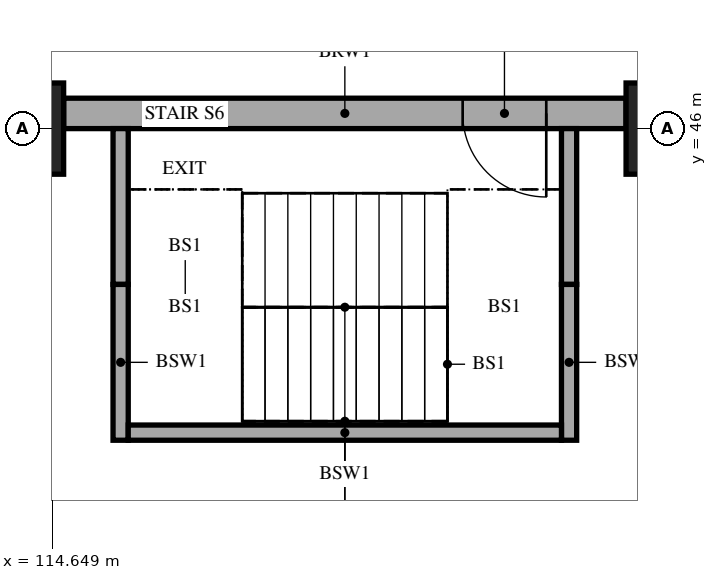
"""IFC4 building model, lengths in metres.
Left out: names, types, materials, properties, quantities, classifications, styles, units other than length and angle.
Written with IfcOpenShell. Run it as: python <this file> out.ifc"""

import sys

from ifc_helpers import new_model, si_unit, direction, frame, frame_2d, origin, origin_2d, place, context, subcontext, project, spatial, rectangle, extrude, element, fill, save


model = new_model("IFC4")
c1 = context("Model", 3, precision=1e-05, world=origin(), true_north=direction((0.0, 1.0)))
c2 = subcontext(c1, "Body", "Model", "MODEL_VIEW")
j1 = project(units=[si_unit("LENGTHUNIT", "METRE"), si_unit("PLANEANGLEUNIT", "RADIAN")], contexts=[c1])
p1 = place(None, origin())
s1 = spatial("IfcSite", under=j1, at=p1, CompositionType="ELEMENT")
p2 = place(p1, origin())
s2 = spatial("IfcBuilding", under=s1, at=p2, CompositionType="ELEMENT")
p3 = place(p2, frame((0.0, 0.0, -4.2)))
s3 = spatial("IfcBuildingStorey", under=s2, at=p3, CompositionType="ELEMENT", Elevation=-4.2)
for number, where, z_axis, x_axis in (
    (1, (114.0, 46.0, 0.0), (0.0, 0.0, 1.0), (1.0, 0.0, 0.0)),
    (2, (123.0, 46.0, 0.0), (0.0, 0.0, 1.0), (1.0, 0.0, 0.0)),
):
    element("IfcColumn", number, at=place(p3, frame(where, z_axis=z_axis, x_axis=x_axis)), inside=s3, PredefinedType="COLUMN", context=c2, shape_type="SweptSolid", body=[
        extrude(rectangle(XDim=1.6, YDim=1.2, at=origin_2d()), origin(), (0.0, 0.0, 1.0), 4.2),
    ])
p4 = place(p3, frame((114.8, 46.2, 0.0), z_axis=(0.0, 0.0, 1.0), x_axis=(1.0, 0.0, 0.0)))
e3 = element("IfcWall", 3, at=p4, inside=s3, PredefinedType="SOLIDWALL", context=c2, shape_type="SweptSolid", body=[
    extrude(rectangle(XDim=7.4, YDim=0.4, at=frame_2d((3.7, 0.0))), origin(), (0.0, 0.0, 1.0), 4.2),
])
p5 = place(p4, frame((5.25, 0.0, 0.0)))
e4 = element("IfcOpeningElement", 4, at=p5, cuts=e3, PredefinedType="OPENING", context=c2, shape_type="SweptSolid", body=[
    extrude(rectangle(XDim=1.1, YDim=2.1, at=frame_2d((0.55, 1.05))), frame((0.0, 0.21, 0.0), z_axis=(0.0, -1.0, 0.0), x_axis=(1.0, 0.0, 0.0)), (0.0, 0.0, 1.0), 0.42),
])
for number, where, z_axis, x_axis in (
    (5, (115.55, 46.0, 0.0), (0.0, 0.0, 1.0), (0.0, -1.0, 0.0)),
    (6, (115.55, 43.95, 0.0), (0.0, 0.0, 1.0), (0.0, -1.0, 0.0)),
    (7, (121.45, 46.0, 0.0), (0.0, 0.0, 1.0), (0.0, -1.0, 0.0)),
    (8, (121.45, 43.95, 0.0), (0.0, 0.0, 1.0), (0.0, -1.0, 0.0)),
):
    element("IfcWall", number, at=place(p3, frame(where, z_axis=z_axis, x_axis=x_axis)), inside=s3, PredefinedType="SOLIDWALL", context=c2, shape_type="SweptSolid", body=[
        extrude(rectangle(XDim=2.05, YDim=0.2, at=frame_2d((1.025, 0.0))), origin(), (0.0, 0.0, 1.0), 4.2),
    ])
p6 = place(p3, frame((115.65, 42.0, 0.0), z_axis=(0.0, 0.0, 1.0), x_axis=(1.0, 0.0, 0.0)))
e9 = element("IfcWall", 9, at=p6, inside=s3, PredefinedType="SOLIDWALL", context=c2, shape_type="SweptSolid", body=[
    extrude(rectangle(XDim=5.7, YDim=0.2, at=frame_2d((2.85, 0.0))), origin(), (0.0, 0.0, 1.0), 4.2),
])
p7 = place(p5, frame((1.1, 0.0, 0.0), z_axis=(0.0, 0.0, 1.0), x_axis=(-1.0, 0.0, 0.0)))
e10 = element("IfcDoor", 10, at=p7, inside=s3, OperationType="SINGLE_SWING_LEFT", PredefinedType="DOOR", context=c2, shape_type="SweptSolid", body=[
    extrude(rectangle(XDim=1.1, YDim=2.1, at=frame_2d((0.55, 1.05))), frame((0.0, 0.025, 0.0), z_axis=(0.0, -1.0, 0.0), x_axis=(1.0, 0.0, 0.0)), (0.0, 0.0, 1.0), 0.05),
])
fill(e4, e10)
save(model, sys.argv[1])
